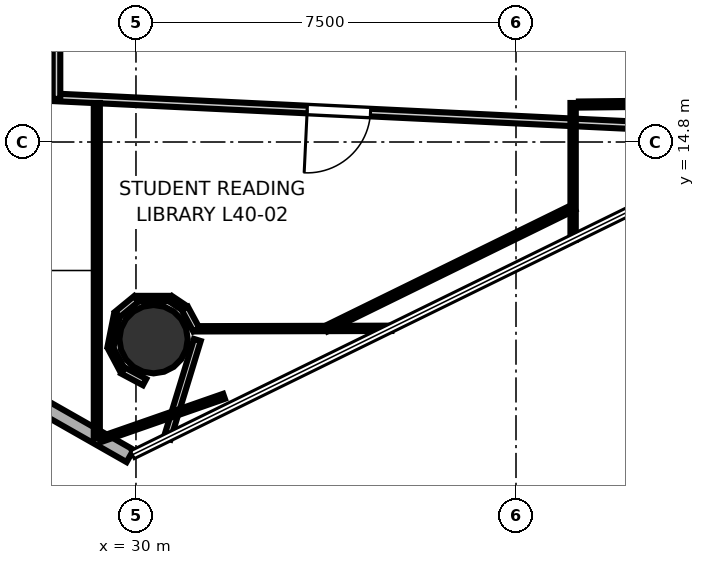
"""IFC4 building model, lengths in metres.
Left out: names, types, materials, properties, quantities, classifications, styles, units other than length and angle.
Written with IfcOpenShell. Run it as: python <this file> out.ifc"""

import sys

from ifc_helpers import new_model, si_unit, direction, frame, frame_2d, origin, origin_2d, place, context, subcontext, project, spatial, rectangle, hollow_circle, extrude, element, fill, save


model = new_model("IFC4")
c1 = context("Model", 3, precision=1e-05, world=origin(), true_north=direction((0.0, 1.0)))
c2 = subcontext(c1, "Body", "Model", "MODEL_VIEW")
j1 = project(units=[si_unit("LENGTHUNIT", "METRE"), si_unit("PLANEANGLEUNIT", "RADIAN")], contexts=[c1])
p1 = place(None, origin())
s1 = spatial("IfcSite", under=j1, at=p1, CompositionType="ELEMENT")
p2 = place(p1, origin())
s2 = spatial("IfcBuilding", under=s1, at=p2, CompositionType="ELEMENT")
p3 = place(p2, frame((0.0, 0.0, 158.7)))
s3 = spatial("IfcBuildingStorey", under=s2, at=p3, CompositionType="ELEMENT", Elevation=158.7)
p4 = place(p3, frame((30.347, 10.909, 0.0), z_axis=(0.0, 0.0, 1.0), x_axis=(1.0, 0.0, 0.0)))
e1 = element("IfcColumn", 1, at=p4, inside=s3, PredefinedType="COLUMN", context=c2, shape_type="SweptSolid", body=[
    extrude(hollow_circle(Radius=0.675, WallThickness=0.032, at=origin_2d()), origin(), (0.0, 0.0, 1.0), 3.7),
])
p5 = place(p3, frame((22.056, 13.056, 0.0), z_axis=(0.0, 0.0, 1.0), x_axis=(0.869262475314, -0.494350835956, 0.0)))
e2 = element("IfcWall", 2, at=p5, inside=s3, PredefinedType="SOLIDWALL", context=c2, shape_type="SweptSolid", body=[
    extrude(rectangle(XDim=9.004, YDim=0.28, at=frame_2d((4.502, 0.0))), origin(), (0.0, 0.0, 1.0), 3.52),
])
p6 = place(p5, frame((1.951, 0.0, 0.85)))
e3 = element("IfcOpeningElement", 3, at=p6, cuts=e2, PredefinedType="OPENING", context=c2, shape_type="SweptSolid", body=[
    extrude(rectangle(XDim=1.5, YDim=2.1, at=frame_2d((0.75, 1.05))), frame((0.0, 0.15, 0.0), z_axis=(0.0, -1.0, 0.0), x_axis=(1.0, 0.0, 0.0)), (0.0, 0.0, 1.0), 0.3),
])
p7 = place(p5, frame((5.553, 0.0, 0.85)))
e4 = element("IfcOpeningElement", 4, at=p7, cuts=e2, PredefinedType="OPENING", context=c2, shape_type="SweptSolid", body=[
    extrude(rectangle(XDim=1.5, YDim=2.1, at=frame_2d((0.75, 1.05))), frame((0.0, 0.15, 0.0), z_axis=(0.0, -1.0, 0.0), x_axis=(1.0, 0.0, 0.0)), (0.0, 0.0, 1.0), 0.3),
])
p8 = place(p3, frame((42.893, 14.982, 0.0), z_axis=(0.0, 0.0, 1.0), x_axis=(-0.9988389824, 0.048173511786, 0.0)))
e5 = element("IfcWall", 5, at=p8, inside=s3, PredefinedType="PARTITIONING", context=c2, shape_type="SweptSolid", body=[
    extrude(rectangle(XDim=14.51, YDim=0.15, at=frame_2d((7.255, 0.0))), origin(), (0.0, 0.0, 1.0), 2.84),
])
p9 = place(p8, frame((8.274, 0.0, 0.0)))
e6 = element("IfcOpeningElement", 6, at=p9, cuts=e5, PredefinedType="OPENING", context=c2, shape_type="SweptSolid", body=[
    extrude(rectangle(XDim=1.25, YDim=2.2, at=frame_2d((0.625, 1.1))), frame((0.0, 0.085, 0.0), z_axis=(0.0, -1.0, 0.0), x_axis=(1.0, 0.0, 0.0)), (0.0, 0.0, 1.0), 0.17),
])
p10 = place(p3, frame((28.431, 15.65, 0.0), z_axis=(0.0, 0.0, 1.0), x_axis=(0.0, 1.0, 0.0)))
e7 = element("IfcWall", 7, at=p10, inside=s3, PredefinedType="PARTITIONING", context=c2, shape_type="SweptSolid", body=[
    extrude(rectangle(XDim=2.4, YDim=0.15, at=frame_2d((1.2, 0.0))), origin(), (0.0, 0.0, 1.0), 2.84),
])
p11 = place(p3, frame((29.227, 15.57, 0.0), z_axis=(0.0, 0.0, 1.0), x_axis=(0.0, -1.0, 0.0)))
e8 = element("IfcWall", 8, at=p11, inside=s3, PredefinedType="PARTITIONING", context=c2, shape_type="SweptSolid", body=[
    extrude(rectangle(XDim=6.612, YDim=0.12, at=frame_2d((3.306, 0.0))), origin(), (0.0, 0.0, 1.0), 2.84),
])
p12 = place(p3, frame((38.644, 13.513, 0.0), z_axis=(0.0, 0.0, 1.0), x_axis=(-0.897915162587, -0.440168559526, 0.0)))
e9 = element("IfcWall", 9, at=p12, inside=s3, PredefinedType="PARTITIONING", context=c2, shape_type="SweptSolid", body=[
    extrude(rectangle(XDim=5.445, YDim=0.12, at=frame_2d((2.722, 0.0))), origin(), (0.0, 0.0, 1.0), 2.84),
])
p13 = place(p3, frame((35.04, 11.123, 0.0), z_axis=(0.0, 0.0, 1.0), x_axis=(-0.999996828806, -0.00251840793, 0.0)))
e10 = element("IfcWall", 10, at=p13, inside=s3, PredefinedType="PARTITIONING", context=c2, shape_type="SweptSolid", body=[
    extrude(rectangle(XDim=3.878, YDim=0.105, at=frame_2d((1.939, 0.0))), origin(), (0.0, 0.0, 1.0), 2.84),
])
p14 = place(p3, frame((31.19, 11.097, 0.0), z_axis=(0.0, 0.0, 1.0), x_axis=(-0.475420071565, 0.879758918996, 0.0)))
e11 = element("IfcWall", 11, at=p14, inside=s3, PredefinedType="PARTITIONING", context=c2, shape_type="SweptSolid", body=[
    extrude(rectangle(XDim=0.474, YDim=0.14, at=frame_2d((0.237, 0.0))), origin(), (0.0, 0.0, 1.0), 2.84),
])
p15 = place(p3, frame((30.955, 11.525, 0.0), z_axis=(0.0, 0.0, 1.0), x_axis=(-0.831126758744, 0.556083007203, 0.0)))
e12 = element("IfcWall", 12, at=p15, inside=s3, PredefinedType="PARTITIONING", context=c2, shape_type="SweptSolid", body=[
    extrude(rectangle(XDim=0.326, YDim=0.12, at=frame_2d((0.163, 0.0))), origin(), (0.0, 0.0, 1.0), 2.84),
])
p16 = place(p3, frame((30.667, 11.711, 0.0), z_axis=(0.0, 0.0, 1.0), x_axis=(-1.0, 0.0, 0.0)))
e13 = element("IfcWall", 13, at=p16, inside=s3, PredefinedType="PARTITIONING", context=c2, shape_type="SweptSolid", body=[
    extrude(rectangle(XDim=0.639, YDim=0.105, at=frame_2d((0.319, 0.0))), origin(), (0.0, 0.0, 1.0), 2.84),
])
p17 = place(p3, frame((30.008, 11.704, 0.0), z_axis=(0.0, 0.0, 1.0), x_axis=(-0.773193692611, -0.634169940715, 0.0)))
e14 = element("IfcWall", 14, at=p17, inside=s3, PredefinedType="PARTITIONING", context=c2, shape_type="SweptSolid", body=[
    extrude(rectangle(XDim=0.485, YDim=0.14, at=frame_2d((0.242, 0.0))), origin(), (0.0, 0.0, 1.0), 2.84),
])
p18 = place(p3, frame((29.622, 11.379, 0.0), z_axis=(0.0, 0.0, 1.0), x_axis=(-0.195234371211, -0.98075661624, 0.0)))
e15 = element("IfcWall", 15, at=p18, inside=s3, PredefinedType="PARTITIONING", context=c2, shape_type="SweptSolid", body=[
    extrude(rectangle(XDim=0.639, YDim=0.12, at=frame_2d((0.319, 0.0))), origin(), (0.0, 0.0, 1.0), 2.84),
])
p19 = place(p3, frame((29.501, 10.731, 0.0), z_axis=(0.0, 0.0, 1.0), x_axis=(0.471424550379, -0.88190639713, 0.0)))
e16 = element("IfcWall", 16, at=p19, inside=s3, PredefinedType="PARTITIONING", context=c2, shape_type="SweptSolid", body=[
    extrude(rectangle(XDim=0.485, YDim=0.105, at=frame_2d((0.242, 0.0))), origin(), (0.0, 0.0, 1.0), 2.84),
])
p20 = place(p3, frame((29.742, 10.291, 0.0), z_axis=(0.0, 0.0, 1.0), x_axis=(0.88190639713, -0.471424550379, 0.0)))
e17 = element("IfcWall", 17, at=p20, inside=s3, PredefinedType="PARTITIONING", context=c2, shape_type="SweptSolid", body=[
    extrude(rectangle(XDim=0.485, YDim=0.14, at=frame_2d((0.242, 0.0))), origin(), (0.0, 0.0, 1.0), 2.84),
])
p21 = place(p3, frame((30.615, 8.948, 0.0), z_axis=(0.0, 0.0, 1.0), x_axis=(0.292812756938, 0.956169801538, 0.0)))
e18 = element("IfcWall", 18, at=p21, inside=s3, PredefinedType="PARTITIONING", context=c2, shape_type="SweptSolid", body=[
    extrude(rectangle(XDim=2.035, YDim=0.14, at=frame_2d((1.018, 0.0))), origin(), (0.0, 0.0, 1.0), 2.84),
])
p22 = place(p3, frame((31.738, 9.781, 0.0), z_axis=(0.0, 0.0, 1.0), x_axis=(-0.944171617612, -0.329454027894, 0.0)))
e19 = element("IfcWall", 19, at=p22, inside=s3, PredefinedType="PARTITIONING", context=c2, shape_type="SweptSolid", body=[
    extrude(rectangle(XDim=2.597, YDim=0.105, at=frame_2d((1.298, 0.0))), origin(), (0.0, 0.0, 1.0), 2.84),
])
p23 = place(p3, frame((38.627, 15.57, 0.0), z_axis=(0.0, 0.0, 1.0), x_axis=(0.0, -1.0, 0.0)))
e20 = element("IfcWall", 20, at=p23, inside=s3, PredefinedType="PARTITIONING", context=c2, shape_type="SweptSolid", body=[
    extrude(rectangle(XDim=2.699, YDim=0.105, at=frame_2d((1.35, 0.0))), origin(), (0.0, 0.0, 1.0), 2.84),
])
p24 = place(p3, frame((38.742, 15.539, 0.0), z_axis=(0.0, 0.0, 1.0), x_axis=(0.999940745371, 0.010886034477, 0.0)))
e21 = element("IfcWall", 21, at=p24, inside=s3, PredefinedType="PARTITIONING", context=c2, shape_type="SweptSolid", body=[
    extrude(rectangle(XDim=5.427, YDim=0.12, at=frame_2d((2.714, 0.0))), origin(), (0.0, 0.0, 1.0), 2.84),
])
p25 = place(p9, origin())
e22 = element("IfcDoor", 22, at=p25, inside=s3, OperationType="SINGLE_SWING_RIGHT", PredefinedType="DOOR", context=c2, shape_type="SweptSolid", body=[
    extrude(rectangle(XDim=1.25, YDim=2.2, at=frame_2d((0.625, 1.1))), frame((0.0, 0.025, 0.0), z_axis=(0.0, -1.0, 0.0), x_axis=(1.0, 0.0, 0.0)), (0.0, 0.0, 1.0), 0.05),
])
fill(e6, e22)
save(model, sys.argv[1])
